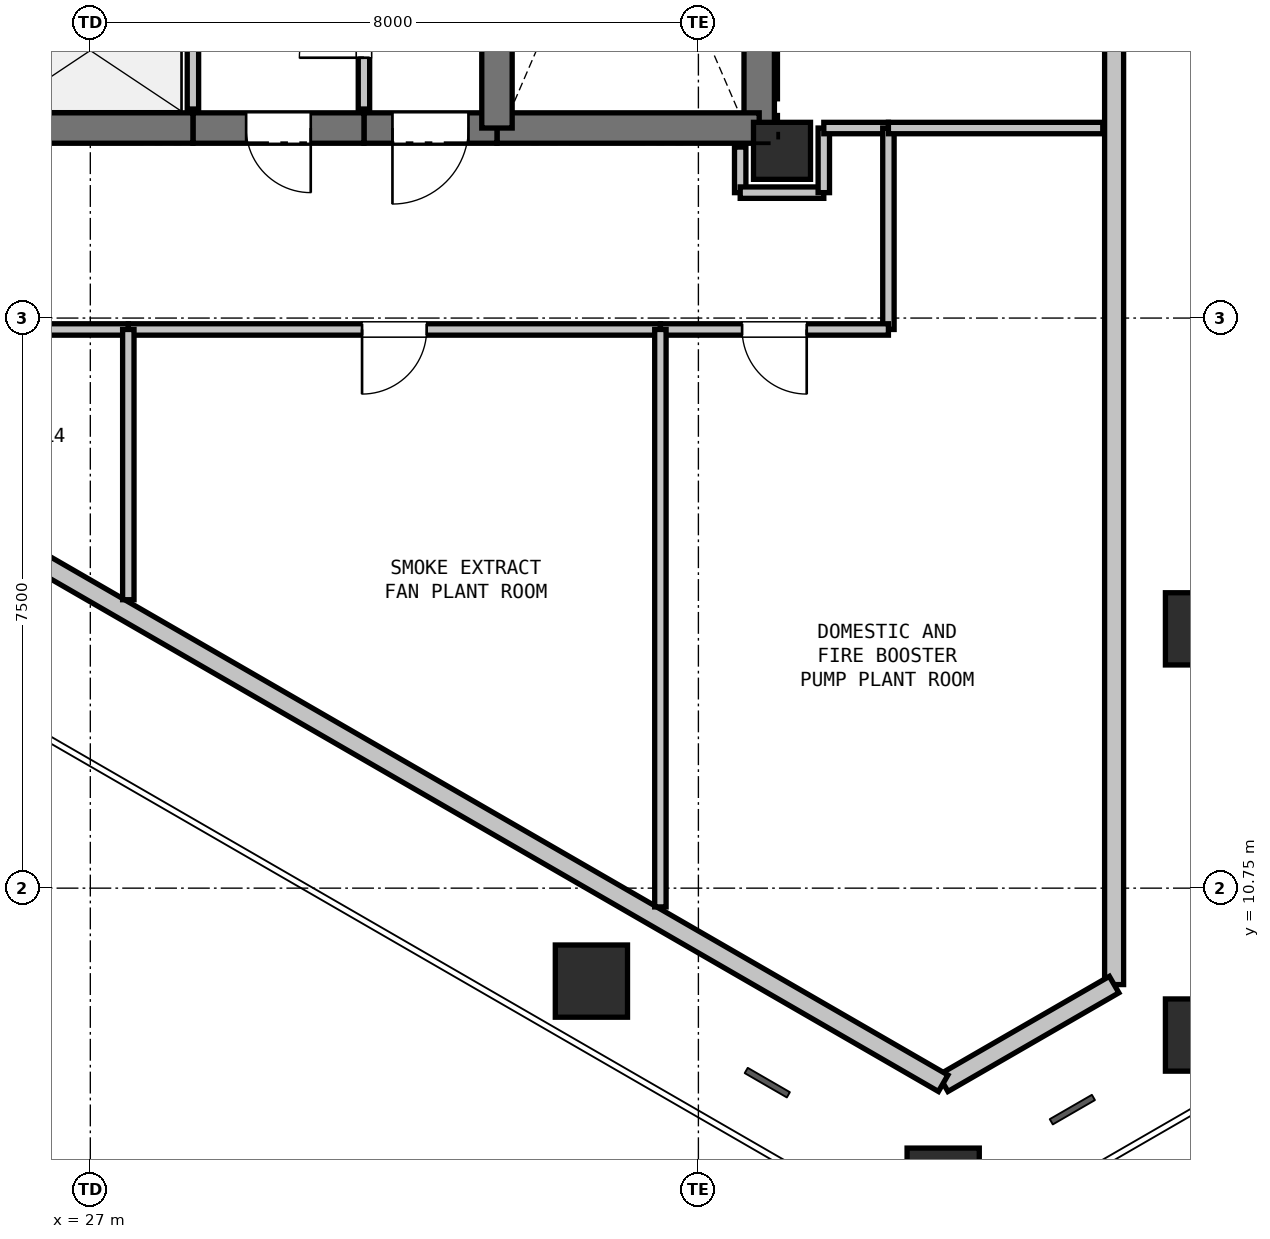
"""IFC4 building model, lengths in metres.
Left out: names, types, materials, properties, quantities, classifications, styles, units other than length and angle.
Written with IfcOpenShell. Run it as: python <this file> out.ifc"""

import sys

from ifc_helpers import new_model, si_unit, direction, frame, frame_2d, origin, origin_2d, place, context, subcontext, project, spatial, rectangle, hollow_rectangle, extrude, element, fill, save


model = new_model("IFC4")
c1 = context("Model", 3, precision=1e-05, world=origin(), true_north=direction((0.0, 1.0)))
c2 = subcontext(c1, "Body", "Model", "MODEL_VIEW")
j1 = project(units=[si_unit("LENGTHUNIT", "METRE"), si_unit("PLANEANGLEUNIT", "RADIAN")], contexts=[c1])
p1 = place(None, origin())
s1 = spatial("IfcSite", under=j1, at=p1, CompositionType="ELEMENT")
p2 = place(p1, origin())
s2 = spatial("IfcBuilding", under=s1, at=p2, CompositionType="ELEMENT")
p3 = place(p2, frame((0.0, 0.0, 160.8)))
s3 = spatial("IfcBuildingStorey", under=s2, at=p3, CompositionType="ELEMENT", Elevation=160.8)
p4 = place(p3, frame((36.1, 20.45, 0.0), z_axis=(0.0, 0.0, 1.0), x_axis=(1.0, 0.0, 0.0)))
e1 = element("IfcColumn", 1, at=p4, inside=s3, PredefinedType="COLUMN", context=c2, shape_type="SweptSolid", body=[
    extrude(rectangle(XDim=0.75, YDim=0.75, at=origin_2d()), origin(), (0.0, 0.0, 1.0), 6.6),
])
for number, where, z_axis, x_axis in (
    (2, (41.619, 14.161, 0.0), (0.0, 0.0, 1.0), (1.0, 0.0, 0.0)),
    (3, (41.619, 8.817, 0.0), (0.0, 0.0, 1.0), (1.0, 0.0, 0.0)),
    (4, (38.22, 6.855, 0.0), (0.0, 0.0, 1.0), (1.0, 0.0, 0.0)),
    (5, (33.593, 9.527, 0.0), (0.0, 0.0, 1.0), (1.0, 0.0, 0.0)),
):
    element("IfcColumn", number, at=place(p3, frame(where, z_axis=z_axis, x_axis=x_axis)), inside=s3, PredefinedType="COLUMN", context=c2, shape_type="SweptSolid", body=[
        extrude(hollow_rectangle(XDim=0.95, YDim=0.95, WallThickness=0.028, at=origin_2d()), origin(), (0.0, 0.0, 1.0), 5.02),
    ])
p5 = place(p3, frame((40.469, 44.019, 0.0), z_axis=(0.0, 0.0, 1.0), x_axis=(0.0, -1.0, 0.0)))
e6 = element("IfcWall", 6, at=p5, inside=s3, PredefinedType="SOLIDWALL", context=c2, shape_type="SweptSolid", body=[
    extrude(rectangle(XDim=34.537, YDim=0.25, at=frame_2d((17.269, 0.0))), origin(), (0.0, 0.0, 1.0), 5.005),
])
p6 = place(p3, frame((40.469, 9.481, 0.0), z_axis=(0.0, 0.0, 1.0), x_axis=(-0.866024317969, -0.500001880682, 0.0)))
e7 = element("IfcWall", 7, at=p6, inside=s3, PredefinedType="SOLIDWALL", context=c2, shape_type="SweptSolid", body=[
    extrude(rectangle(XDim=2.597, YDim=0.25, at=frame_2d((1.298, 0.0))), origin(), (0.0, 0.0, 1.0), 5.005),
])
p7 = place(p3, frame((38.22, 8.183, 0.0), z_axis=(0.0, 0.0, 1.0), x_axis=(-0.866026432802, 0.499998217685, 0.0)))
e8 = element("IfcWall", 8, at=p7, inside=s3, PredefinedType="SOLIDWALL", context=c2, shape_type="SweptSolid", body=[
    extrude(rectangle(XDim=34.537, YDim=0.25, at=frame_2d((17.269, 0.0))), origin(), (0.0, 0.0, 1.0), 5.005),
])
p8 = place(p3, frame((35.8, 28.1, 0.0), z_axis=(0.0, 0.0, 1.0), x_axis=(0.0, -1.0, 0.0)))
e9 = element("IfcWall", 9, at=p8, inside=s3, PredefinedType="SHEAR", context=c2, shape_type="SweptSolid", body=[
    extrude(rectangle(XDim=7.35, YDim=0.4, at=frame_2d((3.675, 0.0))), origin(), (0.0, 0.0, 1.0), 6.37),
])
p9 = place(p3, frame((35.8, 20.75, 0.0), z_axis=(0.0, 0.0, 1.0), x_axis=(-1.0, 0.0, 0.0)))
e10 = element("IfcWall", 10, at=p9, inside=s3, PredefinedType="SHEAR", context=c2, shape_type="SweptSolid", body=[
    extrude(rectangle(XDim=3.45, YDim=0.4, at=frame_2d((1.725, 0.0))), origin(), (0.0, 0.0, 1.0), 6.37),
])
p10 = place(p3, frame((32.35, 20.75, 0.0), z_axis=(0.0, 0.0, 1.0), x_axis=(-1.0, 0.0, 0.0)))
e11 = element("IfcWall", 11, at=p10, inside=s3, PredefinedType="SHEAR", context=c2, shape_type="SweptSolid", body=[
    extrude(rectangle(XDim=1.75, YDim=0.4, at=frame_2d((0.875, 0.0))), origin(), (0.0, 0.0, 1.0), 6.37),
])
p11 = place(p10, frame((0.375, 0.0, 0.0)))
e12 = element("IfcOpeningElement", 12, at=p11, cuts=e11, PredefinedType="OPENING", context=c2, shape_type="SweptSolid", body=[
    extrude(rectangle(XDim=1.0, YDim=2.15, at=frame_2d((0.5, 1.075))), frame((0.0, 0.21, 0.0), z_axis=(0.0, -1.0, 0.0), x_axis=(1.0, 0.0, 0.0)), (0.0, 0.0, 1.0), 0.42),
])
p12 = place(p3, frame((30.6, 20.75, 0.0), z_axis=(0.0, 0.0, 1.0), x_axis=(-1.0, 0.0, 0.0)))
e13 = element("IfcWall", 13, at=p12, inside=s3, PredefinedType="SHEAR", context=c2, shape_type="SweptSolid", body=[
    extrude(rectangle(XDim=2.25, YDim=0.4, at=frame_2d((1.125, 0.0))), origin(), (0.0, 0.0, 1.0), 6.37),
])
p13 = place(p12, frame((0.7, 0.0, 0.0)))
e14 = element("IfcOpeningElement", 14, at=p13, cuts=e13, PredefinedType="OPENING", context=c2, shape_type="SweptSolid", body=[
    extrude(rectangle(XDim=0.85, YDim=2.1, at=frame_2d((0.425, 1.05))), frame((0.0, 0.21, 0.0), z_axis=(0.0, -1.0, 0.0), x_axis=(1.0, 0.0, 0.0)), (0.0, 0.0, 1.0), 0.42),
])
p14 = place(p3, frame((28.35, 20.75, 0.0), z_axis=(0.0, 0.0, 1.0), x_axis=(-1.0, 0.0, 0.0)))
e15 = element("IfcWall", 15, at=p14, inside=s3, PredefinedType="SHEAR", context=c2, shape_type="SweptSolid", body=[
    extrude(rectangle(XDim=2.7, YDim=0.4, at=frame_2d((1.35, 0.0))), origin(), (0.0, 0.0, 1.0), 6.37),
])
p15 = place(p3, frame((32.35, 20.75, 0.0), z_axis=(0.0, 0.0, 1.0), x_axis=(0.0, 1.0, 0.0)))
e16 = element("IfcWall", 16, at=p15, inside=s3, PredefinedType="SHEAR", context=c2, shape_type="SweptSolid", body=[
    extrude(rectangle(XDim=4.8, YDim=0.4, at=frame_2d((2.4, 0.0))), origin(), (0.0, 0.0, 1.0), 6.37),
])
p16 = place(p3, frame((28.35, 23.2, 0.0), z_axis=(0.0, 0.0, 1.0), x_axis=(0.0, -1.0, 0.0)))
e17 = element("IfcWall", 17, at=p16, inside=s3, PredefinedType="PARTITIONING", context=c2, shape_type="SweptSolid", body=[
    extrude(rectangle(XDim=2.2, YDim=0.15, at=frame_2d((1.1, 0.0))), origin(), (0.0, 0.0, 1.0), 6.37),
])
p17 = place(p3, frame((30.6, 21.0, 0.0), z_axis=(0.0, 0.0, 1.0), x_axis=(0.0, 1.0, 0.0)))
e18 = element("IfcWall", 18, at=p17, inside=s3, PredefinedType="PARTITIONING", context=c2, shape_type="SweptSolid", body=[
    extrude(rectangle(XDim=2.2, YDim=0.15, at=frame_2d((1.1, 0.0))), origin(), (0.0, 0.0, 1.0), 6.37),
])
p18 = place(p17, frame((0.675, 0.0, 0.0)))
e19 = element("IfcOpeningElement", 19, at=p18, cuts=e18, PredefinedType="OPENING", context=c2, shape_type="SweptSolid", body=[
    extrude(rectangle(XDim=0.85, YDim=2.1, at=frame_2d((0.425, 1.05))), frame((0.0, 0.085, 0.0), z_axis=(0.0, -1.0, 0.0), x_axis=(1.0, 0.0, 0.0)), (0.0, 0.0, 1.0), 0.17),
])
p19 = place(p3, frame((35.55, 20.5, 0.0), z_axis=(0.0, 0.0, 1.0), x_axis=(0.0, -1.0, 0.0)))
e20 = element("IfcWall", 20, at=p19, inside=s3, PredefinedType="PARTITIONING", context=c2, shape_type="SweptSolid", body=[
    extrude(rectangle(XDim=0.6, YDim=0.15, at=frame_2d((0.3, 0.0))), origin(), (0.0, 0.0, 1.0), 5.895),
])
p20 = place(p3, frame((35.55, 19.9, 0.0), z_axis=(0.0, 0.0, 1.0), x_axis=(1.0, 0.0, 0.0)))
e21 = element("IfcWall", 21, at=p20, inside=s3, PredefinedType="PARTITIONING", context=c2, shape_type="SweptSolid", body=[
    extrude(rectangle(XDim=1.1, YDim=0.15, at=frame_2d((0.55, 0.0))), origin(), (0.0, 0.0, 1.0), 6.37),
])
for number, where, z_axis, x_axis in (
    (22, (36.65, 19.9, 0.0), (0.0, 0.0, 1.0), (0.0, 1.0, 0.0)),
    (23, (36.65, 20.75, 0.0), (0.0, 0.0, 1.0), (1.0, 0.0, 0.0)),
):
    element("IfcWall", number, at=place(p3, frame(where, z_axis=z_axis, x_axis=x_axis)), inside=s3, PredefinedType="PARTITIONING", context=c2, shape_type="SweptSolid", body=[
        extrude(rectangle(XDim=0.85, YDim=0.15, at=frame_2d((0.425, 0.0))), origin(), (0.0, 0.0, 1.0), 6.37),
    ])
p21 = place(p3, frame((37.5, 20.75, 0.0), z_axis=(0.0, 0.0, 1.0), x_axis=(0.0, -1.0, 0.0)))
e24 = element("IfcWall", 24, at=p21, inside=s3, PredefinedType="PARTITIONING", context=c2, shape_type="SweptSolid", body=[
    extrude(rectangle(XDim=2.65, YDim=0.15, at=frame_2d((1.325, 0.0))), origin(), (0.0, 0.0, 1.0), 6.37),
])
p22 = place(p3, frame((37.5, 18.1, 0.0), z_axis=(0.0, 0.0, 1.0), x_axis=(-1.0, 0.0, 0.0)))
e25 = element("IfcWall", 25, at=p22, inside=s3, PredefinedType="PARTITIONING", context=c2, shape_type="SweptSolid", body=[
    extrude(rectangle(XDim=3.0, YDim=0.15, at=frame_2d((1.5, 0.0))), origin(), (0.0, 0.0, 1.0), 5.005),
])
p23 = place(p22, frame((1.075, 0.0, 0.0)))
e26 = element("IfcOpeningElement", 26, at=p23, cuts=e25, PredefinedType="OPENING", context=c2, shape_type="SweptSolid", body=[
    extrude(rectangle(XDim=0.85, YDim=2.1, at=frame_2d((0.425, 1.05))), frame((0.0, 0.085, 0.0), z_axis=(0.0, -1.0, 0.0), x_axis=(1.0, 0.0, 0.0)), (0.0, 0.0, 1.0), 0.17),
])
p24 = place(p3, frame((34.5, 18.1, 0.0), z_axis=(0.0, 0.0, 1.0), x_axis=(-1.0, 0.0, 0.0)))
e27 = element("IfcWall", 27, at=p24, inside=s3, PredefinedType="PARTITIONING", context=c2, shape_type="SweptSolid", body=[
    extrude(rectangle(XDim=7.0, YDim=0.15, at=frame_2d((3.5, 0.0))), origin(), (0.0, 0.0, 1.0), 5.005),
])
p25 = place(p24, frame((3.075, 0.0, 0.0)))
e28 = element("IfcOpeningElement", 28, at=p25, cuts=e27, PredefinedType="OPENING", context=c2, shape_type="SweptSolid", body=[
    extrude(rectangle(XDim=0.85, YDim=2.1, at=frame_2d((0.425, 1.05))), frame((0.0, 0.085, 0.0), z_axis=(0.0, -1.0, 0.0), x_axis=(1.0, 0.0, 0.0)), (0.0, 0.0, 1.0), 0.17),
])
p26 = place(p3, frame((27.5, 18.1, 0.0), z_axis=(0.0, 0.0, 1.0), x_axis=(-1.0, 0.0, 0.0)))
e29 = element("IfcWall", 29, at=p26, inside=s3, PredefinedType="PARTITIONING", context=c2, shape_type="SweptSolid", body=[
    extrude(rectangle(XDim=6.185, YDim=0.15, at=frame_2d((3.093, 0.0))), origin(), (0.0, 0.0, 1.0), 6.37),
])
p27 = place(p26, frame((2.667, 0.0, 0.0)))
e30 = element("IfcOpeningElement", 30, at=p27, cuts=e29, PredefinedType="OPENING", context=c2, shape_type="SweptSolid", body=[
    extrude(rectangle(XDim=0.85, YDim=2.1, at=frame_2d((0.425, 1.05))), frame((0.0, 0.085, 0.0), z_axis=(0.0, -1.0, 0.0), x_axis=(1.0, 0.0, 0.0)), (0.0, 0.0, 1.0), 0.17),
])
p28 = place(p3, frame((27.5, 18.1, 0.0), z_axis=(0.0, 0.0, 1.0), x_axis=(0.0, -1.0, 0.0)))
e31 = element("IfcWall", 31, at=p28, inside=s3, PredefinedType="PARTITIONING", context=c2, shape_type="SweptSolid", body=[
    extrude(rectangle(XDim=3.555, YDim=0.15, at=frame_2d((1.778, 0.0))), origin(), (0.0, 0.0, 1.0), 6.37),
])
p29 = place(p3, frame((34.5, 18.1, 0.0), z_axis=(0.0, 0.0, 1.0), x_axis=(0.0, -1.0, 0.0)))
e32 = element("IfcWall", 32, at=p29, inside=s3, PredefinedType="PARTITIONING", context=c2, shape_type="SweptSolid", body=[
    extrude(rectangle(XDim=7.597, YDim=0.15, at=frame_2d((3.798, 0.0))), origin(), (0.0, 0.0, 1.0), 5.005),
])
p30 = place(p3, frame((37.5, 20.75, 0.0), z_axis=(0.0, 0.0, 1.0), x_axis=(1.0, 0.0, 0.0)))
e33 = element("IfcWall", 33, at=p30, inside=s3, PredefinedType="PARTITIONING", context=c2, shape_type="SweptSolid", body=[
    extrude(rectangle(XDim=2.82, YDim=0.15, at=frame_2d((1.41, 0.0))), origin(), (0.0, 0.0, 1.0), 6.37),
])
p31 = place(p11, origin())
e34 = element("IfcDoor", 34, at=p31, inside=s3, OperationType="SINGLE_SWING_RIGHT", PredefinedType="DOOR", context=c2, shape_type="SweptSolid", body=[
    extrude(rectangle(XDim=1.0, YDim=2.15, at=frame_2d((0.5, 1.075))), frame((0.0, 0.025, 0.0), z_axis=(0.0, -1.0, 0.0), x_axis=(1.0, 0.0, 0.0)), (0.0, 0.0, 1.0), 0.05),
])
fill(e12, e34)
p32 = place(p18, origin())
e35 = element("IfcDoor", 35, at=p32, inside=s3, OperationType="SINGLE_SWING_LEFT", PredefinedType="DOOR", context=c2, shape_type="SweptSolid", body=[
    extrude(rectangle(XDim=0.85, YDim=2.1, at=frame_2d((0.425, 1.05))), frame((0.0, 0.025, 0.0), z_axis=(0.0, -1.0, 0.0), x_axis=(1.0, 0.0, 0.0)), (0.0, 0.0, 1.0), 0.05),
])
fill(e19, e35)
p33 = place(p13, origin())
e36 = element("IfcDoor", 36, at=p33, inside=s3, OperationType="SINGLE_SWING_LEFT", PredefinedType="DOOR", context=c2, shape_type="SweptSolid", body=[
    extrude(rectangle(XDim=0.85, YDim=2.1, at=frame_2d((0.425, 1.05))), frame((0.0, 0.025, 0.0), z_axis=(0.0, -1.0, 0.0), x_axis=(1.0, 0.0, 0.0)), (0.0, 0.0, 1.0), 0.05),
])
fill(e14, e36)
p34 = place(p25, origin())
e37 = element("IfcDoor", 37, at=p34, inside=s3, OperationType="SINGLE_SWING_RIGHT", PredefinedType="DOOR", context=c2, shape_type="SweptSolid", body=[
    extrude(rectangle(XDim=0.85, YDim=2.1, at=frame_2d((0.425, 1.05))), frame((0.0, 0.025, 0.0), z_axis=(0.0, -1.0, 0.0), x_axis=(1.0, 0.0, 0.0)), (0.0, 0.0, 1.0), 0.05),
])
fill(e28, e37)
p35 = place(p23, origin())
e38 = element("IfcDoor", 38, at=p35, inside=s3, OperationType="SINGLE_SWING_LEFT", PredefinedType="DOOR", context=c2, shape_type="SweptSolid", body=[
    extrude(rectangle(XDim=0.85, YDim=2.1, at=frame_2d((0.425, 1.05))), frame((0.0, 0.025, 0.0), z_axis=(0.0, -1.0, 0.0), x_axis=(1.0, 0.0, 0.0)), (0.0, 0.0, 1.0), 0.05),
])
fill(e26, e38)
save(model, sys.argv[1])
